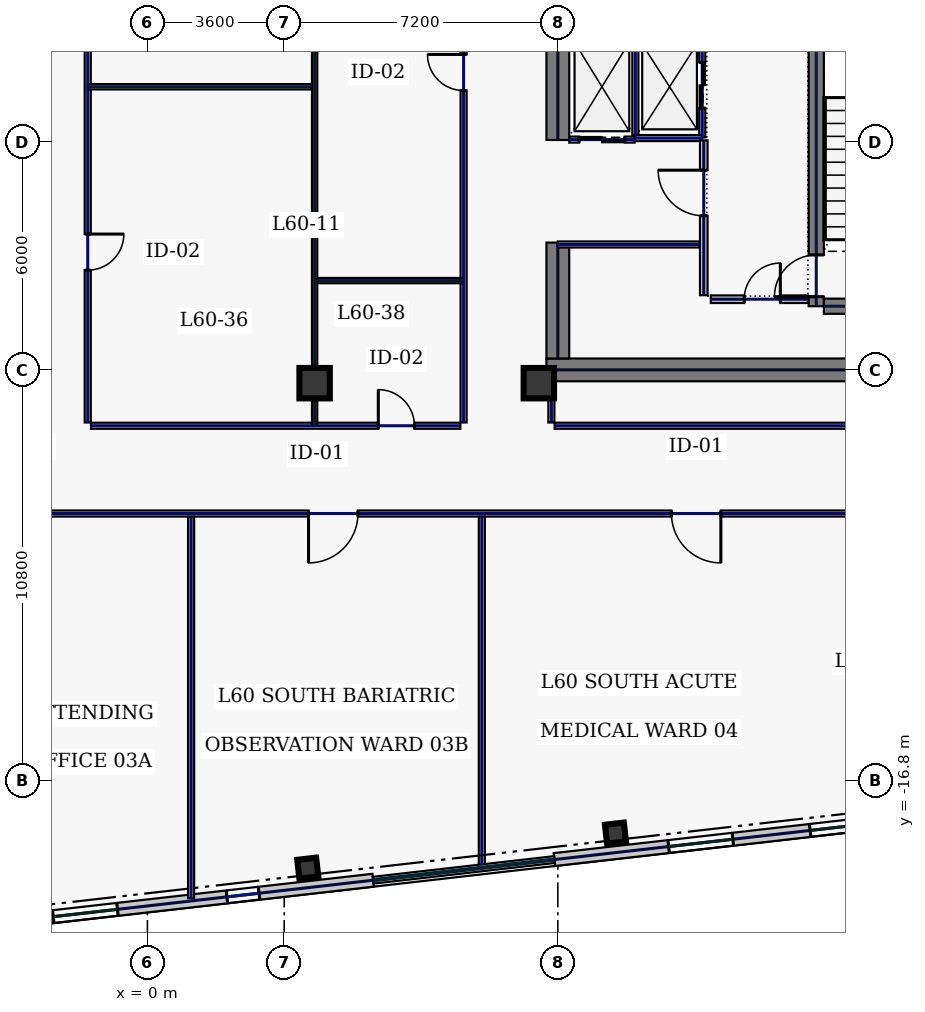
"""IFC4 building model, lengths in metres.
Left out: names, types, materials, properties, quantities, classifications, styles, units other than length and angle.
Written with IfcOpenShell. Run it as: python <this file> out.ifc"""

import sys

from ifc_helpers import new_model, si_unit, direction, frame, frame_2d, origin, origin_2d, place, context, subcontext, project, spatial, rectangle, hollow_rectangle, extrude, element, fill, save


model = new_model("IFC4")
c1 = context("Model", 3, precision=1e-05, world=origin(), true_north=direction((0.0, 1.0)))
c2 = subcontext(c1, "Body", "Model", "MODEL_VIEW")
j1 = project(units=[si_unit("LENGTHUNIT", "METRE"), si_unit("PLANEANGLEUNIT", "RADIAN")], contexts=[c1])
p1 = place(None, origin())
s1 = spatial("IfcSite", under=j1, at=p1, CompositionType="ELEMENT")
p2 = place(p1, origin())
s2 = spatial("IfcBuilding", under=s1, at=p2, CompositionType="ELEMENT")
p3 = place(p2, frame((0.0, 0.0, 259.0)))
s3 = spatial("IfcBuildingStorey", under=s2, at=p3, CompositionType="ELEMENT", Elevation=259.0)
p4 = place(p3, frame((10.5, -6.0, 0.0), z_axis=(0.0, 0.0, 1.0), x_axis=(1.0, 0.0, 0.0)))
e1 = element("IfcWall", 1, at=p4, inside=s3, PredefinedType="SHEAR", context=c2, shape_type="SweptSolid", body=[
    extrude(rectangle(XDim=11.5, YDim=0.6, at=frame_2d((5.75, 0.0))), origin(), (0.0, 0.0, 1.0), 3.74),
])
p5 = place(p3, frame((10.8, -5.7, 0.0), z_axis=(0.0, 0.0, 1.0), x_axis=(0.0, 1.0, 0.0)))
e2 = element("IfcWall", 2, at=p5, inside=s3, PredefinedType="SHEAR", context=c2, shape_type="SweptSolid", body=[
    extrude(rectangle(XDim=3.05, YDim=0.6, at=frame_2d((1.525, 0.0))), origin(), (0.0, 0.0, 1.0), 3.74),
])
p6 = place(p3, frame((10.8, 0.05, 0.0), z_axis=(0.0, 0.0, 1.0), x_axis=(0.0, 1.0, 0.0)))
e3 = element("IfcWall", 3, at=p6, inside=s3, PredefinedType="SHEAR", context=c2, shape_type="SweptSolid", body=[
    extrude(rectangle(XDim=5.65, YDim=0.6, at=frame_2d((2.825, 0.0))), origin(), (0.0, 0.0, 1.0), 3.74),
])
p7 = place(p3, frame((17.6, -4.325, 0.0), z_axis=(0.0, 0.0, 1.0), x_axis=(0.0, 1.0, 0.0)))
e4 = element("IfcWall", 4, at=p7, inside=s3, PredefinedType="SHEAR", context=c2, shape_type="SweptSolid", body=[
    extrude(rectangle(XDim=8.65, YDim=0.4, at=frame_2d((4.325, 0.0))), origin(), (0.0, 0.0, 1.0), 3.74),
])
p8 = place(p7, frame((0.25, 0.0, 0.0)))
e5 = element("IfcOpeningElement", 5, at=p8, cuts=e4, PredefinedType="OPENING", context=c2, shape_type="SweptSolid", body=[
    extrude(rectangle(XDim=1.1, YDim=2.2, at=frame_2d((0.55, 1.1))), frame((0.0, 0.21, 0.0), z_axis=(0.0, -1.0, 0.0), x_axis=(1.0, 0.0, 0.0)), (0.0, 0.0, 1.0), 0.42),
])
p9 = place(p3, frame((17.8, -4.325, 0.0), z_axis=(0.0, 0.0, 1.0), x_axis=(1.0, 0.0, 0.0)))
e6 = element("IfcWall", 6, at=p9, inside=s3, PredefinedType="SHEAR", context=c2, shape_type="SweptSolid", body=[
    extrude(rectangle(XDim=3.4, YDim=0.4, at=frame_2d((1.7, 0.0))), origin(), (0.0, 0.0, 1.0), 3.74),
])
for number, where, z_axis, x_axis in (
    (7, (10.3, -6.35, 0.0), (0.0, 0.0, 1.0), (1.0, 0.0, 0.0)),
    (8, (4.4, -6.35, 0.0), (0.0, 0.0, 1.0), (1.0, 0.0, 0.0)),
):
    element("IfcColumn", number, at=place(p3, frame(where, z_axis=z_axis, x_axis=x_axis)), inside=s3, PredefinedType="COLUMN", context=c2, shape_type="SweptSolid", body=[
        extrude(hollow_rectangle(XDim=0.8, YDim=0.8, WallThickness=0.036, at=origin_2d()), origin(), (0.0, 0.0, 1.0), 3.74),
    ])
for number, where, z_axis, x_axis in (
    (9, (4.22, -19.113, 0.0), (0.0, 0.0, 1.0), (0.994, 0.113, 0.0)),
    (10, (12.316, -18.19, 0.0), (0.0, 0.0, 1.0), (0.994, 0.113, 0.0)),
):
    element("IfcColumn", number, at=place(p3, frame(where, z_axis=z_axis, x_axis=x_axis)), inside=s3, PredefinedType="COLUMN", context=c2, shape_type="SweptSolid", body=[
        extrude(hollow_rectangle(XDim=0.5, YDim=0.5, WallThickness=0.025, at=origin_2d()), origin(), (0.0, 0.0, 1.0), 3.74),
    ])
p10 = place(p3, frame((-5.482, -20.731, 0.0), z_axis=(0.0, 0.0, 1.0), x_axis=(0.993571968199, 0.113202226169, 0.0)))
e11 = element("IfcWall", 11, at=p10, inside=s3, PredefinedType="STANDARD", context=c2, shape_type="SweptSolid", body=[
    extrude(rectangle(XDim=11.497, YDim=0.34, at=frame_2d((5.749, 0.0))), origin(), (0.0, 0.0, 1.0), 3.74),
])
p11 = place(p10, frame((3.024, 0.0, 0.88)))
e12 = element("IfcOpeningElement", 12, at=p11, cuts=e11, PredefinedType="OPENING", context=c2, shape_type="SweptSolid", body=[
    extrude(rectangle(XDim=1.7, YDim=1.95, at=frame_2d((0.85, 0.975))), frame((0.0, 0.18, 0.0), z_axis=(0.0, -1.0, 0.0), x_axis=(1.0, 0.0, 0.0)), (0.0, 0.0, 1.0), 0.36),
])
p12 = place(p10, frame((7.623, 0.0, 0.88)))
e13 = element("IfcOpeningElement", 13, at=p12, cuts=e11, PredefinedType="OPENING", context=c2, shape_type="SweptSolid", body=[
    extrude(rectangle(XDim=0.85, YDim=1.85, at=frame_2d((0.425, 0.925))), frame((0.0, 0.18, 0.0), z_axis=(0.0, -1.0, 0.0), x_axis=(1.0, 0.0, 0.0)), (0.0, 0.0, 1.0), 0.36),
])
p13 = place(p3, frame((10.71, -18.886, 0.0), z_axis=(0.0, 0.0, 1.0), x_axis=(0.993572271362, 0.113199565282, 0.0)))
e14 = element("IfcWall", 14, at=p13, inside=s3, PredefinedType="STANDARD", context=c2, shape_type="SweptSolid", body=[
    extrude(rectangle(XDim=18.651, YDim=0.34, at=frame_2d((9.326, 0.0))), origin(), (0.0, 0.0, 1.0), 3.74),
])
p14 = place(p13, frame((3.024, 0.0, 0.88)))
e15 = element("IfcOpeningElement", 15, at=p14, cuts=e14, PredefinedType="OPENING", context=c2, shape_type="SweptSolid", body=[
    extrude(rectangle(XDim=1.7, YDim=1.95, at=frame_2d((0.85, 0.975))), frame((0.0, 0.18, 0.0), z_axis=(0.0, -1.0, 0.0), x_axis=(1.0, 0.0, 0.0)), (0.0, 0.0, 1.0), 0.36),
])
p15 = place(p13, frame((6.773, 0.0, 0.88)))
e16 = element("IfcOpeningElement", 16, at=p15, cuts=e14, PredefinedType="OPENING", context=c2, shape_type="SweptSolid", body=[
    extrude(rectangle(XDim=1.7, YDim=1.95, at=frame_2d((0.85, 0.975))), frame((0.0, 0.18, 0.0), z_axis=(0.0, -1.0, 0.0), x_axis=(1.0, 0.0, 0.0)), (0.0, 0.0, 1.0), 0.36),
])
p16 = place(p13, frame((11.173, 0.0, 0.88)))
e17 = element("IfcOpeningElement", 17, at=p16, cuts=e14, PredefinedType="OPENING", context=c2, shape_type="SweptSolid", body=[
    extrude(rectangle(XDim=1.7, YDim=1.95, at=frame_2d((0.85, 0.975))), frame((0.0, 0.18, 0.0), z_axis=(0.0, -1.0, 0.0), x_axis=(1.0, 0.0, 0.0)), (0.0, 0.0, 1.0), 0.36),
])
p17 = place(p13, frame((14.921, 0.0, 0.88)))
e18 = element("IfcOpeningElement", 18, at=p17, cuts=e14, PredefinedType="OPENING", context=c2, shape_type="SweptSolid", body=[
    extrude(rectangle(XDim=1.7, YDim=1.95, at=frame_2d((0.85, 0.975))), frame((0.0, 0.18, 0.0), z_axis=(0.0, -1.0, 0.0), x_axis=(1.0, 0.0, 0.0)), (0.0, 0.0, 1.0), 0.36),
])
p18 = place(p3, frame((14.6, 0.12, 0.0), z_axis=(0.0, 0.0, 1.0), x_axis=(0.0, 1.0, 0.0)))
e19 = element("IfcWall", 19, at=p18, inside=s3, PredefinedType="PARTITIONING", context=c2, shape_type="SweptSolid", body=[
    extrude(rectangle(XDim=2.74, YDim=0.16, at=frame_2d((1.37, 0.0))), origin(), (0.0, 0.0, 1.0), 3.74),
])
p19 = place(p18, frame((0.77, 0.0, 0.0)))
e20 = element("IfcOpeningElement", 20, at=p19, cuts=e19, PredefinedType="OPENING", context=c2, shape_type="SweptSolid", body=[
    extrude(rectangle(XDim=1.2, YDim=2.2, at=frame_2d((0.6, 1.1))), frame((0.0, 0.09, 0.0), z_axis=(0.0, -1.0, 0.0), x_axis=(1.0, 0.0, 0.0)), (0.0, 0.0, 1.0), 0.18),
])
p20 = place(p3, frame((12.84, 0.1, 0.0), z_axis=(0.0, 0.0, 1.0), x_axis=(1.0, 0.0, 0.0)))
e21 = element("IfcWall", 21, at=p20, inside=s3, PredefinedType="PARTITIONING", context=c2, shape_type="SweptSolid", body=[
    extrude(rectangle(XDim=1.76, YDim=0.16, at=frame_2d((0.88, 0.0))), origin(), (0.0, 0.0, 1.0), 3.74),
])
p21 = place(p3, frame((12.84, 0.18, 0.0), z_axis=(0.0, 0.0, 1.0), x_axis=(0.0, 1.0, 0.0)))
e22 = element("IfcWall", 22, at=p21, inside=s3, PredefinedType="PARTITIONING", context=c2, shape_type="SweptSolid", body=[
    extrude(rectangle(XDim=2.62, YDim=0.16, at=frame_2d((1.31, 0.0))), origin(), (0.0, 0.0, 1.0), 3.74),
])
p22 = place(p3, frame((11.1, 0.06, 0.0), z_axis=(0.0, 0.0, 1.0), x_axis=(1.0, 0.0, 0.0)))
e23 = element("IfcWall", 23, at=p22, inside=s3, PredefinedType="PARTITIONING", context=c2, shape_type="SweptSolid", body=[
    extrude(rectangle(XDim=1.72, YDim=0.16, at=frame_2d((0.86, 0.0))), origin(), (0.0, 0.0, 1.0), 3.74),
])
p23 = place(p22, frame((0.26, 0.0, 0.0)))
e24 = element("IfcOpeningElement", 24, at=p23, cuts=e23, PredefinedType="OPENING", context=c2, shape_type="SweptSolid", body=[
    extrude(rectangle(XDim=1.2, YDim=2.2, at=frame_2d((0.6, 1.1))), frame((0.0, 0.09, 0.0), z_axis=(0.0, -1.0, 0.0), x_axis=(1.0, 0.0, 0.0)), (0.0, 0.0, 1.0), 0.18),
])
p24 = place(p3, frame((14.825, -4.14, 0.0), z_axis=(0.0, 0.0, 1.0), x_axis=(1.0, 0.0, 0.0)))
e25 = element("IfcWall", 25, at=p24, inside=s3, PredefinedType="SOLIDWALL", context=c2, shape_type="SweptSolid", body=[
    extrude(rectangle(XDim=2.555, YDim=0.2, at=frame_2d((1.277, 0.0))), origin(), (0.0, 0.0, 1.0), 3.74),
])
p25 = place(p24, frame((0.88, 0.0, 0.0)))
e26 = element("IfcOpeningElement", 26, at=p25, cuts=e25, PredefinedType="OPENING", context=c2, shape_type="SweptSolid", body=[
    extrude(rectangle(XDim=0.95, YDim=2.2, at=frame_2d((0.475, 1.1))), frame((0.0, 0.11, 0.0), z_axis=(0.0, -1.0, 0.0), x_axis=(1.0, 0.0, 0.0)), (0.0, 0.0, 1.0), 0.22),
])
p26 = place(p3, frame((10.8, -2.7, 0.0), z_axis=(0.0, 0.0, 1.0), x_axis=(1.0, 0.0, 0.0)))
e27 = element("IfcWall", 27, at=p26, inside=s3, PredefinedType="PARTITIONING", context=c2, shape_type="SweptSolid", body=[
    extrude(rectangle(XDim=3.735, YDim=0.16, at=frame_2d((1.867, 0.0))), origin(), (0.0, 0.0, 1.0), 3.74),
])
p27 = place(p3, frame((14.64, -4.035, 0.0), z_axis=(0.0, 0.0, 1.0), x_axis=(0.0, 1.0, 0.0)))
e28 = element("IfcWall", 28, at=p27, inside=s3, PredefinedType="SOLIDWALL", context=c2, shape_type="SweptSolid", body=[
    extrude(rectangle(XDim=4.075, YDim=0.2, at=frame_2d((2.038, 0.0))), origin(), (0.0, 0.0, 1.0), 3.74),
])
p28 = place(p27, frame((2.09, 0.0, 0.0)))
e29 = element("IfcOpeningElement", 29, at=p28, cuts=e28, PredefinedType="OPENING", context=c2, shape_type="SweptSolid", body=[
    extrude(rectangle(XDim=1.2, YDim=2.2, at=frame_2d((0.6, 1.1))), frame((0.0, 0.11, 0.0), z_axis=(0.0, -1.0, 0.0), x_axis=(1.0, 0.0, 0.0)), (0.0, 0.0, 1.0), 0.22),
])
p29 = place(p3, frame((24.815, -9.78, 0.0), z_axis=(0.0, 0.0, 1.0), x_axis=(-1.0, 0.0, 0.0)))
e30 = element("IfcWall", 30, at=p29, inside=s3, PredefinedType="PARTITIONING", context=c2, shape_type="SweptSolid", body=[
    extrude(rectangle(XDim=37.35, YDim=0.16, at=frame_2d((18.675, 0.0))), origin(), (0.0, 0.0, 1.0), 3.74),
])
p30 = place(p29, frame((27.55, 0.0, 0.0)))
e31 = element("IfcOpeningElement", 31, at=p30, cuts=e30, PredefinedType="OPENING", context=c2, shape_type="SweptSolid", body=[
    extrude(rectangle(XDim=0.95, YDim=2.2, at=frame_2d((0.475, 1.1))), frame((0.0, 0.09, 0.0), z_axis=(0.0, -1.0, 0.0), x_axis=(1.0, 0.0, 0.0)), (0.0, 0.0, 1.0), 0.18),
])
p31 = place(p29, frame((19.275, 0.0, 0.0)))
e32 = element("IfcOpeningElement", 32, at=p31, cuts=e30, PredefinedType="OPENING", context=c2, shape_type="SweptSolid", body=[
    extrude(rectangle(XDim=1.3, YDim=2.2, at=frame_2d((0.65, 1.1))), frame((0.0, 0.09, 0.0), z_axis=(0.0, -1.0, 0.0), x_axis=(1.0, 0.0, 0.0)), (0.0, 0.0, 1.0), 0.18),
])
p32 = place(p29, frame((9.725, 0.0, 0.0)))
e33 = element("IfcOpeningElement", 33, at=p32, cuts=e30, PredefinedType="OPENING", context=c2, shape_type="SweptSolid", body=[
    extrude(rectangle(XDim=1.3, YDim=2.2, at=frame_2d((0.65, 1.1))), frame((0.0, 0.09, 0.0), z_axis=(0.0, -1.0, 0.0), x_axis=(1.0, 0.0, 0.0)), (0.0, 0.0, 1.0), 0.18),
])
p33 = place(p29, frame((2.044, 0.0, 0.0)))
e34 = element("IfcOpeningElement", 34, at=p33, cuts=e30, PredefinedType="OPENING", context=c2, shape_type="SweptSolid", body=[
    extrude(rectangle(XDim=0.95, YDim=2.2, at=frame_2d((0.475, 1.1))), frame((0.0, 0.09, 0.0), z_axis=(0.0, -1.0, 0.0), x_axis=(1.0, 0.0, 0.0)), (0.0, 0.0, 1.0), 0.18),
])
p34 = place(p3, frame((10.63, -6.42, 0.0), z_axis=(0.0, 0.0, 1.0), x_axis=(0.0, -1.0, 0.0)))
e35 = element("IfcWall", 35, at=p34, inside=s3, PredefinedType="PARTITIONING", context=c2, shape_type="SweptSolid", body=[
    extrude(rectangle(XDim=0.965, YDim=0.16, at=frame_2d((0.482, 0.0))), origin(), (0.0, 0.0, 1.0), 3.74),
])
p35 = place(p3, frame((10.715, -7.47, 0.0), z_axis=(0.0, 0.0, 1.0), x_axis=(1.0, 0.0, 0.0)))
e36 = element("IfcWall", 36, at=p35, inside=s3, PredefinedType="PARTITIONING", context=c2, shape_type="SweptSolid", body=[
    extrude(rectangle(XDim=11.87, YDim=0.16, at=frame_2d((5.935, 0.0))), origin(), (0.0, 0.0, 1.0), 3.74),
])
p36 = place(p3, frame((-1.57, 7.435, 0.0), z_axis=(0.0, 0.0, 1.0), x_axis=(0.0, -1.0, 0.0)))
e37 = element("IfcWall", 37, at=p36, inside=s3, PredefinedType="PARTITIONING", context=c2, shape_type="SweptSolid", body=[
    extrude(rectangle(XDim=14.82, YDim=0.16, at=frame_2d((7.41, 0.0))), origin(), (0.0, 0.0, 1.0), 3.74),
])
p37 = place(p36, frame((9.861, 0.0, 0.0)))
e38 = element("IfcOpeningElement", 38, at=p37, cuts=e37, PredefinedType="OPENING", context=c2, shape_type="SweptSolid", body=[
    extrude(rectangle(XDim=0.95, YDim=2.2, at=frame_2d((0.475, 1.1))), frame((0.0, 0.09, 0.0), z_axis=(0.0, -1.0, 0.0), x_axis=(1.0, 0.0, 0.0)), (0.0, 0.0, 1.0), 0.18),
])
p38 = place(p36, frame((2.754, 0.0, 0.0)))
e39 = element("IfcOpeningElement", 39, at=p38, cuts=e37, PredefinedType="OPENING", context=c2, shape_type="SweptSolid", body=[
    extrude(rectangle(XDim=0.95, YDim=2.2, at=frame_2d((0.475, 1.1))), frame((0.0, 0.09, 0.0), z_axis=(0.0, -1.0, 0.0), x_axis=(1.0, 0.0, 0.0)), (0.0, 0.0, 1.0), 0.18),
])
p39 = place(p3, frame((-1.485, -7.47, 0.0), z_axis=(0.0, 0.0, 1.0), x_axis=(1.0, 0.0, 0.0)))
e40 = element("IfcWall", 40, at=p39, inside=s3, PredefinedType="PARTITIONING", context=c2, shape_type="SweptSolid", body=[
    extrude(rectangle(XDim=9.72, YDim=0.16, at=frame_2d((4.86, 0.0))), origin(), (0.0, 0.0, 1.0), 3.74),
])
p40 = place(p39, frame((7.561, 0.0, 0.0)))
e41 = element("IfcOpeningElement", 41, at=p40, cuts=e40, PredefinedType="OPENING", context=c2, shape_type="SweptSolid", body=[
    extrude(rectangle(XDim=0.95, YDim=2.2, at=frame_2d((0.475, 1.1))), frame((0.0, 0.09, 0.0), z_axis=(0.0, -1.0, 0.0), x_axis=(1.0, 0.0, 0.0)), (0.0, 0.0, 1.0), 0.18),
])
p41 = place(p3, frame((8.32, -7.385, 0.0), z_axis=(0.0, 0.0, 1.0), x_axis=(0.0, 1.0, 0.0)))
e42 = element("IfcWall", 42, at=p41, inside=s3, PredefinedType="PARTITIONING", context=c2, shape_type="SweptSolid", body=[
    extrude(rectangle(XDim=14.82, YDim=0.16, at=frame_2d((7.41, 0.0))), origin(), (0.0, 0.0, 1.0), 3.74),
])
p42 = place(p41, frame((8.736, 0.0, 0.0)))
e43 = element("IfcOpeningElement", 43, at=p42, cuts=e42, PredefinedType="OPENING", context=c2, shape_type="SweptSolid", body=[
    extrude(rectangle(XDim=0.95, YDim=2.2, at=frame_2d((0.475, 1.1))), frame((0.0, 0.09, 0.0), z_axis=(0.0, -1.0, 0.0), x_axis=(1.0, 0.0, 0.0)), (0.0, 0.0, 1.0), 0.18),
])
p43 = place(p3, frame((8.8, -19.034, 0.0), z_axis=(0.0, 0.0, 1.0), x_axis=(0.0, 1.0, 0.0)))
e44 = element("IfcWall", 44, at=p43, inside=s3, PredefinedType="PARTITIONING", context=c2, shape_type="SweptSolid", body=[
    extrude(rectangle(XDim=9.169, YDim=0.16, at=frame_2d((4.584, 0.0))), origin(), (0.0, 0.0, 1.0), 3.74),
])
p44 = place(p3, frame((1.15, -19.906, 0.0), z_axis=(0.0, 0.0, 1.0), x_axis=(0.0, 1.0, 0.0)))
e45 = element("IfcWall", 45, at=p44, inside=s3, PredefinedType="PARTITIONING", context=c2, shape_type="SweptSolid", body=[
    extrude(rectangle(XDim=10.041, YDim=0.16, at=frame_2d((5.02, 0.0))), origin(), (0.0, 0.0, 1.0), 3.74),
])
p45 = place(p3, frame((4.4, -7.465, 0.0), z_axis=(0.0, 0.0, 1.0), x_axis=(0.0, 1.0, 0.0)))
e46 = element("IfcWall", 46, at=p45, inside=s3, PredefinedType="PARTITIONING", context=c2, shape_type="SweptSolid", body=[
    extrude(rectangle(XDim=14.98, YDim=0.14, at=frame_2d((7.49, 0.0))), origin(), (0.0, 0.0, 1.0), 3.035),
])
p46 = place(p3, frame((-1.565, 1.45, 0.0), z_axis=(0.0, 0.0, 1.0), x_axis=(1.0, 0.0, 0.0)))
e47 = element("IfcWall", 47, at=p46, inside=s3, PredefinedType="PARTITIONING", context=c2, shape_type="SweptSolid", body=[
    extrude(rectangle(XDim=5.89, YDim=0.14, at=frame_2d((2.945, 0.0))), origin(), (0.0, 0.0, 1.0), 3.74),
])
p47 = place(p3, frame((4.475, -3.65, 0.0), z_axis=(0.0, 0.0, 1.0), x_axis=(1.0, 0.0, 0.0)))
e48 = element("IfcWall", 48, at=p47, inside=s3, PredefinedType="PARTITIONING", context=c2, shape_type="SweptSolid", body=[
    extrude(rectangle(XDim=3.84, YDim=0.14, at=frame_2d((1.92, 0.0))), origin(), (0.0, 0.0, 1.0), 3.74),
])
p48 = place(p11, origin())
e49 = element("IfcWindow", 49, at=p48, inside=s3, PartitioningType="SINGLE_PANEL", PredefinedType="WINDOW", context=c2, shape_type="SweptSolid", body=[
    extrude(rectangle(XDim=1.7, YDim=1.95, at=frame_2d((0.85, 0.975))), frame((0.0, 0.03, 0.0), z_axis=(0.0, -1.0, 0.0), x_axis=(1.0, 0.0, 0.0)), (0.0, 0.0, 1.0), 0.06),
])
fill(e12, e49)
p49 = place(p12, origin())
e50 = element("IfcWindow", 50, at=p49, inside=s3, PartitioningType="SINGLE_PANEL", PredefinedType="WINDOW", context=c2, shape_type="SweptSolid", body=[
    extrude(rectangle(XDim=0.85, YDim=1.85, at=frame_2d((0.425, 0.925))), frame((0.0, 0.03, 0.0), z_axis=(0.0, -1.0, 0.0), x_axis=(1.0, 0.0, 0.0)), (0.0, 0.0, 1.0), 0.06),
])
fill(e13, e50)
p50 = place(p14, origin())
e51 = element("IfcWindow", 51, at=p50, inside=s3, PartitioningType="SINGLE_PANEL", PredefinedType="WINDOW", context=c2, shape_type="SweptSolid", body=[
    extrude(rectangle(XDim=1.7, YDim=1.95, at=frame_2d((0.85, 0.975))), frame((0.0, 0.03, 0.0), z_axis=(0.0, -1.0, 0.0), x_axis=(1.0, 0.0, 0.0)), (0.0, 0.0, 1.0), 0.06),
])
fill(e15, e51)
p51 = place(p15, origin())
e52 = element("IfcWindow", 52, at=p51, inside=s3, PartitioningType="SINGLE_PANEL", PredefinedType="WINDOW", context=c2, shape_type="SweptSolid", body=[
    extrude(rectangle(XDim=1.7, YDim=1.95, at=frame_2d((0.85, 0.975))), frame((0.0, 0.03, 0.0), z_axis=(0.0, -1.0, 0.0), x_axis=(1.0, 0.0, 0.0)), (0.0, 0.0, 1.0), 0.06),
])
fill(e16, e52)
p52 = place(p8, origin())
e53 = element("IfcDoor", 53, at=p52, inside=s3, OperationType="SINGLE_SWING_LEFT", PredefinedType="DOOR", context=c2, shape_type="SweptSolid", body=[
    extrude(rectangle(XDim=1.1, YDim=2.2, at=frame_2d((0.55, 1.1))), frame((0.0, 0.025, 0.0), z_axis=(0.0, -1.0, 0.0), x_axis=(1.0, 0.0, 0.0)), (0.0, 0.0, 1.0), 0.05),
])
fill(e5, e53)
p53 = place(p19, origin())
e54 = element("IfcDoor", 54, at=p53, inside=s3, OperationType="SLIDING_TO_LEFT", PredefinedType="DOOR", context=c2, shape_type="SweptSolid", body=[
    extrude(rectangle(XDim=1.2, YDim=2.2, at=frame_2d((0.6, 1.1))), frame((0.0, 0.025, 0.0), z_axis=(0.0, -1.0, 0.0), x_axis=(1.0, 0.0, 0.0)), (0.0, 0.0, 1.0), 0.05),
])
fill(e20, e54)
p54 = place(p23, origin())
e55 = element("IfcDoor", 55, at=p54, inside=s3, OperationType="SLIDING_TO_LEFT", PredefinedType="DOOR", context=c2, shape_type="SweptSolid", body=[
    extrude(rectangle(XDim=1.2, YDim=2.2, at=frame_2d((0.6, 1.1))), frame((0.0, 0.025, 0.0), z_axis=(0.0, -1.0, 0.0), x_axis=(1.0, 0.0, 0.0)), (0.0, 0.0, 1.0), 0.05),
])
fill(e24, e55)
p55 = place(p25, origin())
e56 = element("IfcDoor", 56, at=p55, inside=s3, OperationType="SINGLE_SWING_RIGHT", PredefinedType="DOOR", context=c2, shape_type="SweptSolid", body=[
    extrude(rectangle(XDim=0.95, YDim=2.2, at=frame_2d((0.475, 1.1))), frame((0.0, 0.025, 0.0), z_axis=(0.0, -1.0, 0.0), x_axis=(1.0, 0.0, 0.0)), (0.0, 0.0, 1.0), 0.05),
])
fill(e26, e56)
p56 = place(p28, origin())
e57 = element("IfcDoor", 57, at=p56, inside=s3, OperationType="SINGLE_SWING_RIGHT", PredefinedType="DOOR", context=c2, shape_type="SweptSolid", body=[
    extrude(rectangle(XDim=1.2, YDim=2.2, at=frame_2d((0.6, 1.1))), frame((0.0, 0.025, 0.0), z_axis=(0.0, -1.0, 0.0), x_axis=(1.0, 0.0, 0.0)), (0.0, 0.0, 1.0), 0.05),
])
fill(e29, e57)
p57 = place(p31, origin())
e58 = element("IfcDoor", 58, at=p57, inside=s3, OperationType="SINGLE_SWING_RIGHT", PredefinedType="DOOR", context=c2, shape_type="SweptSolid", body=[
    extrude(rectangle(XDim=1.3, YDim=2.2, at=frame_2d((0.65, 1.1))), frame((0.0, 0.025, 0.0), z_axis=(0.0, -1.0, 0.0), x_axis=(1.0, 0.0, 0.0)), (0.0, 0.0, 1.0), 0.05),
])
fill(e32, e58)
p58 = place(p32, origin())
e59 = element("IfcDoor", 59, at=p58, inside=s3, OperationType="SINGLE_SWING_LEFT", PredefinedType="DOOR", context=c2, shape_type="SweptSolid", body=[
    extrude(rectangle(XDim=1.3, YDim=2.2, at=frame_2d((0.65, 1.1))), frame((0.0, 0.025, 0.0), z_axis=(0.0, -1.0, 0.0), x_axis=(1.0, 0.0, 0.0)), (0.0, 0.0, 1.0), 0.05),
])
fill(e33, e59)
p59 = place(p37, origin())
e60 = element("IfcDoor", 60, at=p59, inside=s3, OperationType="SINGLE_SWING_LEFT", PredefinedType="DOOR", context=c2, shape_type="SweptSolid", body=[
    extrude(rectangle(XDim=0.95, YDim=2.2, at=frame_2d((0.475, 1.1))), frame((0.0, 0.025, 0.0), z_axis=(0.0, -1.0, 0.0), x_axis=(1.0, 0.0, 0.0)), (0.0, 0.0, 1.0), 0.05),
])
fill(e38, e60)
p60 = place(p40, origin())
e61 = element("IfcDoor", 61, at=p60, inside=s3, OperationType="SINGLE_SWING_LEFT", PredefinedType="DOOR", context=c2, shape_type="SweptSolid", body=[
    extrude(rectangle(XDim=0.95, YDim=2.2, at=frame_2d((0.475, 1.1))), frame((0.0, 0.025, 0.0), z_axis=(0.0, -1.0, 0.0), x_axis=(1.0, 0.0, 0.0)), (0.0, 0.0, 1.0), 0.05),
])
fill(e41, e61)
p61 = place(p42, origin())
e62 = element("IfcDoor", 62, at=p61, inside=s3, OperationType="SINGLE_SWING_RIGHT", PredefinedType="DOOR", context=c2, shape_type="SweptSolid", body=[
    extrude(rectangle(XDim=0.95, YDim=2.2, at=frame_2d((0.475, 1.1))), frame((0.0, 0.025, 0.0), z_axis=(0.0, -1.0, 0.0), x_axis=(1.0, 0.0, 0.0)), (0.0, 0.0, 1.0), 0.05),
])
fill(e43, e62)
save(model, sys.argv[1])
